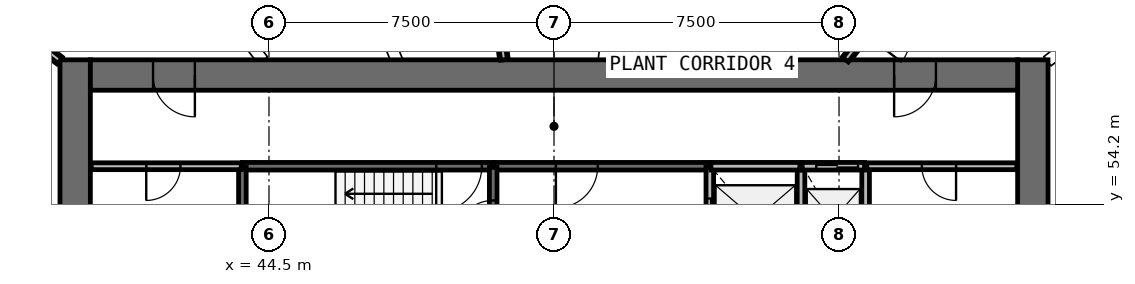
"""IFC4 building model, lengths in metres.
Left out: names, types, materials, properties, quantities, classifications, styles, units other than length and angle.
Written with IfcOpenShell. Run it as: python <this file> out.ifc"""

import sys

from ifc_helpers import new_model, si_unit, direction, frame, frame_2d, origin, place, context, subcontext, project, spatial, rectangle, extrude, source, transform, mapped, element, fill, save


model = new_model("IFC4")
c1 = context("Model", 3, precision=1e-05, world=origin(), true_north=direction((0.0, 1.0)))
c2 = subcontext(c1, "Body", "Model", "MODEL_VIEW")
j1 = project(units=[si_unit("LENGTHUNIT", "METRE"), si_unit("PLANEANGLEUNIT", "RADIAN")], contexts=[c1])
p1 = place(None, origin())
s1 = spatial("IfcSite", under=j1, at=p1, CompositionType="ELEMENT")
p2 = place(p1, origin())
s2 = spatial("IfcBuilding", under=s1, at=p2, CompositionType="ELEMENT")
p3 = place(p2, frame((0.0, 0.0, 129.0)))
s3 = spatial("IfcBuildingStorey", under=s2, at=p3, CompositionType="ELEMENT", Elevation=129.0)
p4 = place(p3, frame((64.6, 38.0, 0.0), z_axis=(0.0, 0.0, 1.0), x_axis=(0.0, 1.0, 0.0)))
e1 = element("IfcWall", 1, at=p4, inside=s3, PredefinedType="SHEAR", context=c2, shape_type="SweptSolid", body=[
    extrude(rectangle(XDim=20.0, YDim=0.8, at=frame_2d((10.0, 0.0))), origin(), (0.0, 0.0, 1.0), 4.1),
])
p5 = place(p4, frame((9.1, 0.0, 0.0)))
e2 = element("IfcOpeningElement", 2, at=p5, cuts=e1, PredefinedType="OPENING", context=c2, shape_type="SweptSolid", body=[
    extrude(rectangle(XDim=1.8, YDim=2.1, at=frame_2d((0.9, 1.05))), frame((0.0, 0.41, 0.0), z_axis=(0.0, -1.0, 0.0), x_axis=(1.0, 0.0, 0.0)), (0.0, 0.0, 1.0), 0.82),
])
p6 = place(p3, frame((39.4, 58.0, 0.0), z_axis=(0.0, 0.0, 1.0), x_axis=(0.0, -1.0, 0.0)))
e3 = element("IfcWall", 3, at=p6, inside=s3, PredefinedType="SHEAR", context=c2, shape_type="SweptSolid", body=[
    extrude(rectangle(XDim=20.0, YDim=0.8, at=frame_2d((10.0, 0.0))), origin(), (0.0, 0.0, 1.0), 4.1),
])
p7 = place(p6, frame((9.1, 0.0, 0.0)))
e4 = element("IfcOpeningElement", 4, at=p7, cuts=e3, PredefinedType="OPENING", context=c2, shape_type="SweptSolid", body=[
    extrude(rectangle(XDim=1.8, YDim=2.1, at=frame_2d((0.9, 1.05))), frame((0.0, 0.41, 0.0), z_axis=(0.0, -1.0, 0.0), x_axis=(1.0, 0.0, 0.0)), (0.0, 0.0, 1.0), 0.82),
])
p8 = place(p3, frame((64.2, 57.6, 0.0), z_axis=(0.0, 0.0, 1.0), x_axis=(-1.0, 0.0, 0.0)))
e5 = element("IfcWall", 5, at=p8, inside=s3, PredefinedType="SHEAR", context=c2, shape_type="SweptSolid", body=[
    extrude(rectangle(XDim=24.4, YDim=0.8, at=frame_2d((12.2, 0.0))), origin(), (0.0, 0.0, 1.0), 4.1),
])
p9 = place(p8, frame((21.65, 0.0, 0.0)))
e6 = element("IfcOpeningElement", 6, at=p9, cuts=e5, PredefinedType="OPENING", context=c2, shape_type="SweptSolid", body=[
    extrude(rectangle(XDim=1.1, YDim=2.1, at=frame_2d((0.55, 1.05))), frame((0.0, 0.41, 0.0), z_axis=(0.0, -1.0, 0.0), x_axis=(1.0, 0.0, 0.0)), (0.0, 0.0, 1.0), 0.82),
])
p10 = place(p8, frame((2.15, 0.0, 0.0)))
e7 = element("IfcOpeningElement", 7, at=p10, cuts=e5, PredefinedType="OPENING", context=c2, shape_type="SweptSolid", body=[
    extrude(rectangle(XDim=1.1, YDim=2.1, at=frame_2d((0.55, 1.05))), frame((0.0, 0.41, 0.0), z_axis=(0.0, -1.0, 0.0), x_axis=(1.0, 0.0, 0.0)), (0.0, 0.0, 1.0), 0.82),
])
p11 = place(p3, frame((50.4, 55.2, 0.0), z_axis=(0.0, 0.0, 1.0), x_axis=(-1.0, 0.0, 0.0)))
e8 = element("IfcWall", 8, at=p11, inside=s3, PredefinedType="SOLIDWALL", context=c2, shape_type="SweptSolid", body=[
    extrude(rectangle(XDim=6.6, YDim=0.2, at=frame_2d((3.3, 0.0))), origin(), (0.0, 0.0, 1.0), 3.78),
])
p12 = place(p11, frame((0.3, 0.0, 0.0)))
e9 = element("IfcOpeningElement", 9, at=p12, cuts=e8, PredefinedType="OPENING", context=c2, shape_type="SweptSolid", body=[
    extrude(rectangle(XDim=1.2, YDim=2.1, at=frame_2d((0.6, 1.05))), frame((0.0, 0.11, 0.0), z_axis=(0.0, -1.0, 0.0), x_axis=(1.0, 0.0, 0.0)), (0.0, 0.0, 1.0), 0.22),
])
p13 = place(p3, frame((56.1, 55.2, 0.0), z_axis=(0.0, 0.0, 1.0), x_axis=(-1.0, 0.0, 0.0)))
e10 = element("IfcWall", 10, at=p13, inside=s3, PredefinedType="SOLIDWALL", context=c2, shape_type="SweptSolid", body=[
    extrude(rectangle(XDim=5.67, YDim=0.2, at=frame_2d((2.835, 0.0))), origin(), (0.0, 0.0, 1.0), 3.78),
])
p14 = place(p13, frame((2.95, 0.0, 0.0)))
e11 = element("IfcOpeningElement", 11, at=p14, cuts=e10, PredefinedType="OPENING", context=c2, shape_type="SweptSolid", body=[
    extrude(rectangle(XDim=1.1, YDim=2.1, at=frame_2d((0.55, 1.05))), frame((0.0, 0.11, 0.0), z_axis=(0.0, -1.0, 0.0), x_axis=(1.0, 0.0, 0.0)), (0.0, 0.0, 1.0), 0.22),
])
p15 = place(p3, frame((50.4, 52.4, 0.0), z_axis=(0.0, 0.0, 1.0), x_axis=(0.0, 1.0, 0.0)))
e12 = element("IfcWall", 12, at=p15, inside=s3, PredefinedType="SOLIDWALL", context=c2, shape_type="SweptSolid", body=[
    extrude(rectangle(XDim=2.77, YDim=0.2, at=frame_2d((1.385, 0.0))), origin(), (0.0, 0.0, 1.0), 3.78),
])
p16 = place(p15, frame((0.9, 0.0, 0.0)))
e13 = element("IfcOpeningElement", 13, at=p16, cuts=e12, PredefinedType="OPENING", context=c2, shape_type="SweptSolid", body=[
    extrude(rectangle(XDim=1.0, YDim=2.1, at=frame_2d((0.5, 1.05))), frame((0.0, 0.11, 0.0), z_axis=(0.0, -1.0, 0.0), x_axis=(1.0, 0.0, 0.0)), (0.0, 0.0, 1.0), 0.22),
])
p17 = place(p3, frame((56.1, 55.17, 0.0), z_axis=(0.0, 0.0, 1.0), x_axis=(0.0, -1.0, 0.0)))
e14 = element("IfcWall", 14, at=p17, inside=s3, PredefinedType="SOLIDWALL", context=c2, shape_type="SweptSolid", body=[
    extrude(rectangle(XDim=2.77, YDim=0.2, at=frame_2d((1.385, 0.0))), origin(), (0.0, 0.0, 1.0), 3.78),
])
p18 = place(p17, frame((0.82, 0.0, 0.0)))
e15 = element("IfcOpeningElement", 15, at=p18, cuts=e14, PredefinedType="OPENING", context=c2, shape_type="SweptSolid", body=[
    extrude(rectangle(XDim=1.1, YDim=2.1, at=frame_2d((0.55, 1.05))), frame((0.0, 0.11, 0.0), z_axis=(0.0, -1.0, 0.0), x_axis=(1.0, 0.0, 0.0)), (0.0, 0.0, 1.0), 0.22),
])
for number, where, z_axis, x_axis in (
    (16, (58.5, 52.4, 0.0), (0.0, 0.0, 1.0), (0.0, 1.0, 0.0)),
    (17, (60.2, 52.4, 0.0), (0.0, 0.0, 1.0), (0.0, 1.0, 0.0)),
):
    element("IfcWall", number, at=place(p3, frame(where, z_axis=z_axis, x_axis=x_axis)), inside=s3, PredefinedType="SOLIDWALL", context=c2, shape_type="SweptSolid", body=[
        extrude(rectangle(XDim=2.8, YDim=0.2, at=frame_2d((1.4, 0.0))), origin(), (0.0, 0.0, 1.0), 3.78),
    ])
p19 = place(p3, frame((58.47, 55.2, 0.0), z_axis=(0.0, 0.0, 1.0), x_axis=(-1.0, 0.0, 0.0)))
e18 = element("IfcWall", 18, at=p19, inside=s3, PredefinedType="SOLIDWALL", context=c2, shape_type="SweptSolid", body=[
    extrude(rectangle(XDim=2.34, YDim=0.2, at=frame_2d((1.17, 0.0))), origin(), (0.0, 0.0, 1.0), 3.78),
])
p20 = place(p3, frame((43.8, 55.17, 0.0), z_axis=(0.0, 0.0, 1.0), x_axis=(0.0, -1.0, 0.0)))
e19 = element("IfcWall", 19, at=p20, inside=s3, PredefinedType="SOLIDWALL", context=c2, shape_type="SweptSolid", body=[
    extrude(rectangle(XDim=2.14, YDim=0.2, at=frame_2d((1.07, 0.0))), origin(), (0.0, 0.0, 1.0), 3.78),
])
p21 = place(p3, frame((60.17, 55.2, 0.0), z_axis=(0.0, 0.0, 1.0), x_axis=(-1.0, 0.0, 0.0)))
e20 = element("IfcWall", 20, at=p21, inside=s3, PredefinedType="SOLIDWALL", context=c2, shape_type="SweptSolid", body=[
    extrude(rectangle(XDim=1.64, YDim=0.2, at=frame_2d((0.82, 0.0))), origin(), (0.0, 0.0, 1.0), 3.78),
])
p22 = place(p21, frame((0.17, 0.0, 0.0)))
e21 = element("IfcOpeningElement", 21, at=p22, cuts=e20, PredefinedType="OPENING", context=c2, shape_type="SweptSolid", body=[
    extrude(rectangle(XDim=1.1, YDim=2.1, at=frame_2d((0.55, 1.05))), frame((0.0, 0.11, 0.0), z_axis=(0.0, -1.0, 0.0), x_axis=(1.0, 0.0, 0.0)), (0.0, 0.0, 1.0), 0.22),
])
p23 = place(p3, frame((64.18, 55.2, 0.0), z_axis=(0.0, 0.0, 1.0), x_axis=(-1.0, 0.0, 0.0)))
e22 = element("IfcWall", 22, at=p23, inside=s3, PredefinedType="PARTITIONING", context=c2, shape_type="SweptSolid", body=[
    extrude(rectangle(XDim=3.95, YDim=0.18, at=frame_2d((1.975, 0.0))), origin(), (0.0, 0.0, 1.0), 3.78),
])
p24 = place(p23, frame((1.6, 0.0, 0.0)))
e23 = element("IfcOpeningElement", 23, at=p24, cuts=e22, PredefinedType="OPENING", context=c2, shape_type="SweptSolid", body=[
    extrude(rectangle(XDim=0.9, YDim=2.1, at=frame_2d((0.45, 1.05))), frame((0.0, 0.1, 0.0), z_axis=(0.0, -1.0, 0.0), x_axis=(1.0, 0.0, 0.0)), (0.0, 0.0, 1.0), 0.2),
])
p25 = place(p3, frame((43.77, 55.2, 0.0), z_axis=(0.0, 0.0, 1.0), x_axis=(-1.0, 0.0, 0.0)))
e24 = element("IfcWall", 24, at=p25, inside=s3, PredefinedType="PARTITIONING", context=c2, shape_type="SweptSolid", body=[
    extrude(rectangle(XDim=3.95, YDim=0.18, at=frame_2d((1.975, 0.0))), origin(), (0.0, 0.0, 1.0), 3.78),
])
p26 = place(p25, frame((1.6, 0.0, 0.0)))
e25 = element("IfcOpeningElement", 25, at=p26, cuts=e24, PredefinedType="OPENING", context=c2, shape_type="SweptSolid", body=[
    extrude(rectangle(XDim=0.9, YDim=2.1, at=frame_2d((0.45, 1.05))), frame((0.0, 0.1, 0.0), z_axis=(0.0, -1.0, 0.0), x_axis=(1.0, 0.0, 0.0)), (0.0, 0.0, 1.0), 0.2),
])
p27 = place(p3, frame((61.446, 60.31, 0.0), z_axis=(0.0, 0.0, 1.0), x_axis=(-0.608737787706, -0.793371480341, 0.0)))
e26 = element("IfcWall", 26, at=p27, inside=s3, PredefinedType="PARTITIONING", context=c2, shape_type="SweptSolid", body=[
    extrude(rectangle(XDim=2.912, YDim=0.18, at=frame_2d((1.456, 0.0))), origin(), (0.0, 0.0, 1.0), 2.58),
])
p28 = place(p27, frame((0.862, 0.0, 0.0)))
e27 = element("IfcOpeningElement", 27, at=p28, cuts=e26, PredefinedType="OPENING", context=c2, shape_type="SweptSolid", body=[
    extrude(rectangle(XDim=1.2, YDim=2.1, at=frame_2d((0.6, 1.05))), frame((0.0, 0.1, 0.0), z_axis=(0.0, -1.0, 0.0), x_axis=(1.0, 0.0, 0.0)), (0.0, 0.0, 1.0), 0.2),
])
p29 = place(p3, frame((50.371, 60.37, 0.0), z_axis=(0.0, 0.0, 1.0), x_axis=(0.13060507681, -0.991434472828, 0.0)))
e28 = element("IfcWall", 28, at=p29, inside=s3, PredefinedType="PARTITIONING", context=c2, shape_type="SweptSolid", body=[
    extrude(rectangle(XDim=2.391, YDim=0.18, at=frame_2d((1.195, 0.0))), origin(), (0.0, 0.0, 1.0), 2.58),
])
p30 = place(p29, frame((0.541, 0.0, 0.0)))
e29 = element("IfcOpeningElement", 29, at=p30, cuts=e28, PredefinedType="OPENING", context=c2, shape_type="SweptSolid", body=[
    extrude(rectangle(XDim=1.2, YDim=2.1, at=frame_2d((0.6, 1.05))), frame((0.0, 0.1, 0.0), z_axis=(0.0, -1.0, 0.0), x_axis=(1.0, 0.0, 0.0)), (0.0, 0.0, 1.0), 0.2),
])
p31 = place(p3, frame((37.168, 59.381, 0.0), z_axis=(0.0, 0.0, 1.0), x_axis=(0.793393624489, -0.608708926023, 0.0)))
e30 = element("IfcWall", 30, at=p31, inside=s3, PredefinedType="PARTITIONING", context=c2, shape_type="SweptSolid", body=[
    extrude(rectangle(XDim=2.309, YDim=0.18, at=frame_2d((1.155, 0.0))), origin(), (0.0, 0.0, 1.0), 2.58),
])
p32 = place(p31, frame((0.459, 0.0, 0.0)))
e31 = element("IfcOpeningElement", 31, at=p32, cuts=e30, PredefinedType="OPENING", context=c2, shape_type="SweptSolid", body=[
    extrude(rectangle(XDim=1.2, YDim=2.1, at=frame_2d((0.6, 1.05))), frame((0.0, 0.1, 0.0), z_axis=(0.0, -1.0, 0.0), x_axis=(1.0, 0.0, 0.0)), (0.0, 0.0, 1.0), 0.2),
])
m1 = source(origin(), c2, "Body", "SweptSolid", [
    extrude(rectangle(XDim=1.1, YDim=2.1, at=frame_2d((0.55, 1.05))), frame((0.0, 0.025, 0.0), z_axis=(0.0, -1.0, 0.0), x_axis=(1.0, 0.0, 0.0)), (0.0, 0.0, 1.0), 0.05),
])
p33 = place(p18, origin())
e32 = element("IfcDoor", 32, at=p33, inside=s3, OperationType="DOUBLE_DOOR_SLIDING", PredefinedType="USERDEFINED", context=c2, shape_type="MappedRepresentation", body=[
    mapped(m1, transform((0.0, 0.0, 0.0), scale=1.0)),
])
fill(e15, e32)
p34 = place(p22, origin())
e33 = element("IfcDoor", 33, at=p34, inside=s3, OperationType="DOUBLE_DOOR_SLIDING", PredefinedType="USERDEFINED", context=c2, shape_type="MappedRepresentation", body=[
    mapped(m1, transform((0.0, 0.0, 0.0), scale=1.0)),
])
fill(e21, e33)
m2 = source(origin(), c2, "Body", "SweptSolid", [
    extrude(rectangle(XDim=1.2, YDim=2.1, at=frame_2d((0.6, 1.05))), frame((0.0, 0.025, 0.0), z_axis=(0.0, -1.0, 0.0), x_axis=(1.0, 0.0, 0.0)), (0.0, 0.0, 1.0), 0.05),
])
p35 = place(p12, origin())
e34 = element("IfcDoor", 34, at=p35, inside=s3, OperationType="SINGLE_SWING_RIGHT", PredefinedType="DOOR", context=c2, shape_type="MappedRepresentation", body=[
    mapped(m2, transform((0.0, 0.0, 0.0), scale=1.0)),
])
fill(e9, e34)
m3 = source(origin(), c2, "Body", "SweptSolid", [
    extrude(rectangle(XDim=1.0, YDim=2.1, at=frame_2d((0.5, 1.05))), frame((0.0, 0.025, 0.0), z_axis=(0.0, -1.0, 0.0), x_axis=(1.0, 0.0, 0.0)), (0.0, 0.0, 1.0), 0.05),
])
p36 = place(p16, origin())
e35 = element("IfcDoor", 35, at=p36, inside=s3, OperationType="SINGLE_SWING_LEFT", PredefinedType="DOOR", context=c2, shape_type="MappedRepresentation", body=[
    mapped(m3, transform((0.0, 0.0, 0.0), scale=1.0)),
])
fill(e13, e35)
m4 = source(origin(), c2, "Body", "SweptSolid", [
    extrude(rectangle(XDim=1.1, YDim=2.1, at=frame_2d((0.55, 1.05))), frame((0.0, 0.025, 0.0), z_axis=(0.0, -1.0, 0.0), x_axis=(1.0, 0.0, 0.0)), (0.0, 0.0, 1.0), 0.05),
])
p37 = place(p14, origin())
e36 = element("IfcDoor", 36, at=p37, inside=s3, OperationType="SINGLE_SWING_RIGHT", PredefinedType="DOOR", context=c2, shape_type="MappedRepresentation", body=[
    mapped(m4, transform((0.0, 0.0, 0.0), scale=1.0)),
])
fill(e11, e36)
m5 = source(origin(), c2, "Body", "SweptSolid", [
    extrude(rectangle(XDim=1.1, YDim=2.1, at=frame_2d((0.55, 1.05))), frame((0.0, 0.025, 0.0), z_axis=(0.0, -1.0, 0.0), x_axis=(1.0, 0.0, 0.0)), (0.0, 0.0, 1.0), 0.05),
])
p38 = place(p9, origin())
e37 = element("IfcDoor", 37, at=p38, inside=s3, OperationType="SINGLE_SWING_LEFT", PredefinedType="DOOR", context=c2, shape_type="MappedRepresentation", body=[
    mapped(m5, transform((0.0, 0.0, 0.0), scale=1.0)),
])
fill(e6, e37)
p39 = place(p10, origin())
e38 = element("IfcDoor", 38, at=p39, inside=s3, OperationType="SINGLE_SWING_RIGHT", PredefinedType="DOOR", context=c2, shape_type="MappedRepresentation", body=[
    mapped(m5, transform((0.0, 0.0, 0.0), scale=1.0)),
])
fill(e7, e38)
m6 = source(origin(), c2, "Body", "SweptSolid", [
    extrude(rectangle(XDim=0.9, YDim=2.1, at=frame_2d((0.45, 1.05))), frame((0.0, 0.025, 0.0), z_axis=(0.0, -1.0, 0.0), x_axis=(1.0, 0.0, 0.0)), (0.0, 0.0, 1.0), 0.05),
])
p40 = place(p26, origin())
e39 = element("IfcDoor", 39, at=p40, inside=s3, OperationType="SINGLE_SWING_RIGHT", PredefinedType="DOOR", context=c2, shape_type="MappedRepresentation", body=[
    mapped(m6, transform((0.0, 0.0, 0.0), scale=1.0)),
])
fill(e25, e39)
p41 = place(p24, origin())
e40 = element("IfcDoor", 40, at=p41, inside=s3, OperationType="SINGLE_SWING_LEFT", PredefinedType="DOOR", context=c2, shape_type="MappedRepresentation", body=[
    mapped(m6, transform((0.0, 0.0, 0.0), scale=1.0)),
])
fill(e23, e40)
save(model, sys.argv[1])
